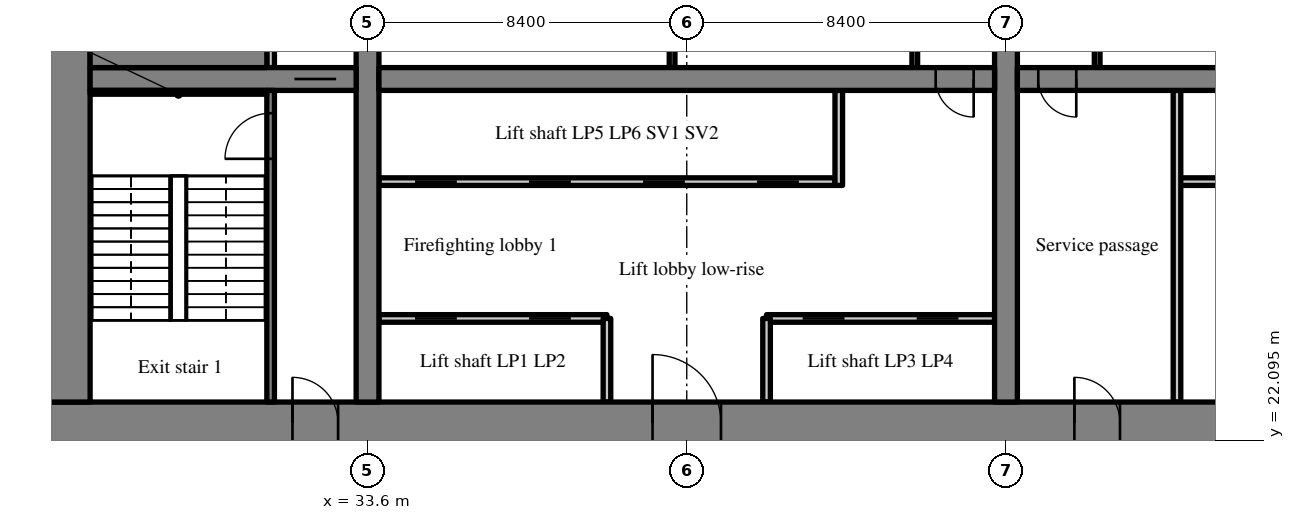
"""IFC4 building model, lengths in metres.
Left out: names, types, materials, properties, quantities, classifications, styles, units other than length and angle.
Written with IfcOpenShell. Run it as: python <this file> out.ifc"""

import sys

from ifc_helpers import new_model, si_unit, direction, frame, frame_2d, origin, place, context, subcontext, project, spatial, rectangle, extrude, source, transform, mapped, element, fill, save


model = new_model("IFC4")
c1 = context("Model", 3, precision=1e-05, world=origin(), true_north=direction((0.0, 1.0)))
c2 = subcontext(c1, "Body", "Model", "MODEL_VIEW")
j1 = project(units=[si_unit("LENGTHUNIT", "METRE"), si_unit("PLANEANGLEUNIT", "RADIAN")], contexts=[c1])
p1 = place(None, origin())
s1 = spatial("IfcSite", under=j1, at=p1, CompositionType="ELEMENT")
p2 = place(p1, origin())
s2 = spatial("IfcBuilding", under=s1, at=p2, CompositionType="ELEMENT")
p3 = place(p2, frame((0.0, 0.0, 23.0)))
s3 = spatial("IfcBuildingStorey", under=s2, at=p3, CompositionType="ELEMENT", Elevation=23.0)
m1 = source(origin(), c2, "Body", "SweptSolid", [
    extrude(rectangle(XDim=50.4, YDim=1.1, at=frame_2d((25.2, 0.0))), origin(), (0.0, 0.0, 1.0), 4.52),
])
p4 = place(p3, frame((25.2, 22.55, 0.0), z_axis=(0.0, 0.0, 1.0), x_axis=(1.0, 0.0, 0.0)))
e1 = element("IfcWall", 1, at=p4, inside=s3, PredefinedType="SHEAR", context=c2, shape_type="MappedRepresentation", body=[
    mapped(m1, transform((0.0, 0.0, 0.0), scale=1.0)),
])
m2 = source(origin(), c2, "Body", "SweptSolid", [
    extrude(rectangle(XDim=1.8, YDim=2.1, at=frame_2d((0.9, 1.05))), frame((0.0, 0.56, 0.0), z_axis=(0.0, -1.0, 0.0), x_axis=(1.0, 0.0, 0.0)), (0.0, 0.0, 1.0), 1.12),
])
p5 = place(p4, frame((15.9, 0.0, 0.0)))
e2 = element("IfcOpeningElement", 2, at=p5, cuts=e1, PredefinedType="OPENING", context=c2, shape_type="MappedRepresentation", body=[
    mapped(m2, transform((0.0, 0.0, 0.0), scale=1.0)),
])
m3 = source(origin(), c2, "Body", "SweptSolid", [
    extrude(rectangle(XDim=1.2, YDim=2.1, at=frame_2d((0.6, 1.05))), frame((0.0, 0.56, 0.0), z_axis=(0.0, -1.0, 0.0), x_axis=(1.0, 0.0, 0.0)), (0.0, 0.0, 1.0), 1.12),
])
p6 = place(p4, frame((27.0, 0.0, 0.0)))
e3 = element("IfcOpeningElement", 3, at=p6, cuts=e1, PredefinedType="OPENING", context=c2, shape_type="MappedRepresentation", body=[
    mapped(m3, transform((0.0, 0.0, 0.0), scale=1.0)),
])
m4 = source(origin(), c2, "Body", "SweptSolid", [
    extrude(rectangle(XDim=0.9, YDim=2.1, at=frame_2d((0.45, 1.05))), frame((0.0, 0.56, 0.0), z_axis=(0.0, -1.0, 0.0), x_axis=(1.0, 0.0, 0.0)), (0.0, 0.0, 1.0), 1.12),
])
p7 = place(p4, frame((32.25, 0.0, 0.0)))
e4 = element("IfcOpeningElement", 4, at=p7, cuts=e1, PredefinedType="OPENING", context=c2, shape_type="MappedRepresentation", body=[
    mapped(m4, transform((0.0, 0.0, 0.0), scale=1.0)),
])
p8 = place(p4, frame((38.25, 0.0, 0.0)))
e5 = element("IfcOpeningElement", 5, at=p8, cuts=e1, PredefinedType="OPENING", context=c2, shape_type="MappedRepresentation", body=[
    mapped(m4, transform((0.0, 0.0, 0.0), scale=1.0)),
])
p9 = place(p4, frame((6.425, 0.0, 0.0)))
e6 = element("IfcOpeningElement", 6, at=p9, cuts=e1, PredefinedType="OPENING", context=c2, shape_type="MappedRepresentation", body=[
    mapped(m3, transform((0.0, 0.0, 0.0), scale=1.0)),
])
p10 = place(p4, frame((47.675, 0.0, 0.0)))
e7 = element("IfcOpeningElement", 7, at=p10, cuts=e1, PredefinedType="OPENING", context=c2, shape_type="MappedRepresentation", body=[
    mapped(m3, transform((0.0, 0.0, 0.0), scale=1.0)),
])
m5 = source(origin(), c2, "Body", "SweptSolid", [
    extrude(rectangle(XDim=17.8, YDim=1.1, at=frame_2d((8.9, 0.0))), origin(), (0.0, 0.0, 1.0), 4.52),
])
p11 = place(p3, frame((25.75, 23.1, 0.0), z_axis=(0.0, 0.0, 1.0), x_axis=(0.0, 1.0, 0.0)))
e8 = element("IfcWall", 8, at=p11, inside=s3, PredefinedType="SHEAR", context=c2, shape_type="MappedRepresentation", body=[
    mapped(m5, transform((0.0, 0.0, 0.0), scale=1.0)),
])
m6 = source(origin(), c2, "Body", "SweptSolid", [
    extrude(rectangle(XDim=17.8, YDim=0.6, at=frame_2d((8.9, 0.0))), origin(), (0.0, 0.0, 1.0), 4.52),
])
p12 = place(p3, frame((33.6, 23.1, 0.0), z_axis=(0.0, 0.0, 1.0), x_axis=(0.0, 1.0, 0.0)))
e9 = element("IfcWall", 9, at=p12, inside=s3, PredefinedType="SHEAR", context=c2, shape_type="MappedRepresentation", body=[
    mapped(m6, transform((0.0, 0.0, 0.0), scale=1.0)),
])
m7 = source(origin(), c2, "Body", "SweptSolid", [
    extrude(rectangle(XDim=1.1, YDim=2.1, at=frame_2d((0.55, 1.05))), frame((0.0, 0.31, 0.0), z_axis=(0.0, -1.0, 0.0), x_axis=(1.0, 0.0, 0.0)), (0.0, 0.0, 1.0), 0.62),
])
p13 = place(p12, frame((12.35, 0.0, 0.0)))
e10 = element("IfcOpeningElement", 10, at=p13, cuts=e9, PredefinedType="OPENING", context=c2, shape_type="MappedRepresentation", body=[
    mapped(m7, transform((0.0, 0.0, 0.0), scale=1.0)),
])
p14 = place(p3, frame((50.4, 23.1, 0.0), z_axis=(0.0, 0.0, 1.0), x_axis=(0.0, 1.0, 0.0)))
e11 = element("IfcWall", 11, at=p14, inside=s3, PredefinedType="SHEAR", context=c2, shape_type="MappedRepresentation", body=[
    mapped(m6, transform((0.0, 0.0, 0.0), scale=1.0)),
])
p15 = place(p14, frame((12.35, 0.0, 0.0)))
e12 = element("IfcOpeningElement", 12, at=p15, cuts=e11, PredefinedType="OPENING", context=c2, shape_type="MappedRepresentation", body=[
    mapped(m7, transform((0.0, 0.0, 0.0), scale=1.0)),
])
m8 = source(origin(), c2, "Body", "SweptSolid", [
    extrude(rectangle(XDim=7.0, YDim=0.6, at=frame_2d((3.5, 0.0))), origin(), (0.0, 0.0, 1.0), 4.52),
])
p16 = place(p3, frame((26.3, 31.6, 0.0), z_axis=(0.0, 0.0, 1.0), x_axis=(1.0, 0.0, 0.0)))
e13 = element("IfcWall", 13, at=p16, inside=s3, PredefinedType="SHEAR", context=c2, shape_type="MappedRepresentation", body=[
    mapped(m8, transform((0.0, 0.0, 0.0), scale=1.0)),
])
p17 = place(p16, frame((5.375, 0.0, 0.0)))
e14 = element("IfcOpeningElement", 14, at=p17, cuts=e13, PredefinedType="OPENING", context=c2, shape_type="MappedRepresentation", body=[
    mapped(m7, transform((0.0, 0.0, 0.0), scale=1.0)),
])
m9 = source(origin(), c2, "Body", "SweptSolid", [
    extrude(rectangle(XDim=16.2, YDim=0.6, at=frame_2d((8.1, 0.0))), origin(), (0.0, 0.0, 1.0), 4.52),
])
p18 = place(p3, frame((33.9, 31.6, 0.0), z_axis=(0.0, 0.0, 1.0), x_axis=(1.0, 0.0, 0.0)))
e15 = element("IfcWall", 15, at=p18, inside=s3, PredefinedType="SHEAR", context=c2, shape_type="MappedRepresentation", body=[
    mapped(m9, transform((0.0, 0.0, 0.0), scale=1.0)),
])
m10 = source(origin(), c2, "Body", "SweptSolid", [
    extrude(rectangle(XDim=1.0, YDim=2.1, at=frame_2d((0.5, 1.05))), frame((0.0, 0.31, 0.0), z_axis=(0.0, -1.0, 0.0), x_axis=(1.0, 0.0, 0.0)), (0.0, 0.0, 1.0), 0.62),
])
p19 = place(p18, frame((14.65, 0.0, 0.0)))
e16 = element("IfcOpeningElement", 16, at=p19, cuts=e15, PredefinedType="OPENING", context=c2, shape_type="MappedRepresentation", body=[
    mapped(m10, transform((0.0, 0.0, 0.0), scale=1.0)),
])
m11 = source(origin(), c2, "Body", "SweptSolid", [
    extrude(rectangle(XDim=16.2, YDim=0.6, at=frame_2d((8.1, 0.0))), origin(), (0.0, 0.0, 1.0), 4.52),
])
p20 = place(p3, frame((50.7, 31.6, 0.0), z_axis=(0.0, 0.0, 1.0), x_axis=(1.0, 0.0, 0.0)))
e17 = element("IfcWall", 17, at=p20, inside=s3, PredefinedType="SHEAR", context=c2, shape_type="MappedRepresentation", body=[
    mapped(m11, transform((0.0, 0.0, 0.0), scale=1.0)),
])
p21 = place(p20, frame((0.55, 0.0, 0.0)))
e18 = element("IfcOpeningElement", 18, at=p21, cuts=e17, PredefinedType="OPENING", context=c2, shape_type="MappedRepresentation", body=[
    mapped(m10, transform((0.0, 0.0, 0.0), scale=1.0)),
])
m12 = source(origin(), c2, "Body", "SweptSolid", [
    extrude(rectangle(XDim=6.0, YDim=0.2, at=frame_2d((3.0, 0.0))), origin(), (0.0, 0.0, 1.0), 4.52),
])
p22 = place(p3, frame((33.9, 25.3, 0.0), z_axis=(0.0, 0.0, 1.0), x_axis=(1.0, 0.0, 0.0)))
e19 = element("IfcWall", 19, at=p22, inside=s3, PredefinedType="SOLIDWALL", context=c2, shape_type="MappedRepresentation", body=[
    mapped(m12, transform((0.0, 0.0, 0.0), scale=1.0)),
])
m13 = source(origin(), c2, "Body", "SweptSolid", [
    extrude(rectangle(XDim=1.1, YDim=2.1, at=frame_2d((0.55, 1.05))), frame((0.0, 0.11, 0.0), z_axis=(0.0, -1.0, 0.0), x_axis=(1.0, 0.0, 0.0)), (0.0, 0.0, 1.0), 0.22),
])
p23 = place(p22, frame((0.95, 0.0, 0.0)))
e20 = element("IfcOpeningElement", 20, at=p23, cuts=e19, PredefinedType="OPENING", context=c2, shape_type="MappedRepresentation", body=[
    mapped(m13, transform((0.0, 0.0, 0.0), scale=1.0)),
])
p24 = place(p22, frame((3.95, 0.0, 0.0)))
e21 = element("IfcOpeningElement", 21, at=p24, cuts=e19, PredefinedType="OPENING", context=c2, shape_type="MappedRepresentation", body=[
    mapped(m13, transform((0.0, 0.0, 0.0), scale=1.0)),
])
p25 = place(p3, frame((44.1, 25.3, 0.0), z_axis=(0.0, 0.0, 1.0), x_axis=(1.0, 0.0, 0.0)))
e22 = element("IfcWall", 22, at=p25, inside=s3, PredefinedType="SOLIDWALL", context=c2, shape_type="MappedRepresentation", body=[
    mapped(m12, transform((0.0, 0.0, 0.0), scale=1.0)),
])
p26 = place(p25, frame((0.95, 0.0, 0.0)))
e23 = element("IfcOpeningElement", 23, at=p26, cuts=e22, PredefinedType="OPENING", context=c2, shape_type="MappedRepresentation", body=[
    mapped(m13, transform((0.0, 0.0, 0.0), scale=1.0)),
])
p27 = place(p25, frame((3.95, 0.0, 0.0)))
e24 = element("IfcOpeningElement", 24, at=p27, cuts=e22, PredefinedType="OPENING", context=c2, shape_type="MappedRepresentation", body=[
    mapped(m13, transform((0.0, 0.0, 0.0), scale=1.0)),
])
m14 = source(origin(), c2, "Body", "SweptSolid", [
    extrude(rectangle(XDim=12.0, YDim=0.2, at=frame_2d((6.0, 0.0))), origin(), (0.0, 0.0, 1.0), 4.52),
])
p28 = place(p3, frame((33.9, 28.9, 0.0), z_axis=(0.0, 0.0, 1.0), x_axis=(1.0, 0.0, 0.0)))
e25 = element("IfcWall", 25, at=p28, inside=s3, PredefinedType="SOLIDWALL", context=c2, shape_type="MappedRepresentation", body=[
    mapped(m14, transform((0.0, 0.0, 0.0), scale=1.0)),
])
p29 = place(p28, frame((0.95, 0.0, 0.0)))
e26 = element("IfcOpeningElement", 26, at=p29, cuts=e25, PredefinedType="OPENING", context=c2, shape_type="MappedRepresentation", body=[
    mapped(m13, transform((0.0, 0.0, 0.0), scale=1.0)),
])
p30 = place(p28, frame((3.95, 0.0, 0.0)))
e27 = element("IfcOpeningElement", 27, at=p30, cuts=e25, PredefinedType="OPENING", context=c2, shape_type="MappedRepresentation", body=[
    mapped(m13, transform((0.0, 0.0, 0.0), scale=1.0)),
])
p31 = place(p28, frame((6.95, 0.0, 0.0)))
e28 = element("IfcOpeningElement", 28, at=p31, cuts=e25, PredefinedType="OPENING", context=c2, shape_type="MappedRepresentation", body=[
    mapped(m13, transform((0.0, 0.0, 0.0), scale=1.0)),
])
p32 = place(p28, frame((9.95, 0.0, 0.0)))
e29 = element("IfcOpeningElement", 29, at=p32, cuts=e25, PredefinedType="OPENING", context=c2, shape_type="MappedRepresentation", body=[
    mapped(m13, transform((0.0, 0.0, 0.0), scale=1.0)),
])
m15 = source(origin(), c2, "Body", "SweptSolid", [
    extrude(rectangle(XDim=2.2, YDim=0.2, at=frame_2d((1.1, 0.0))), origin(), (0.0, 0.0, 1.0), 4.52),
])
for number, where, z_axis, x_axis in (
    (30, (39.9, 23.1, 0.0), (0.0, 0.0, 1.0), (0.0, 1.0, 0.0)),
    (31, (44.1, 23.1, 0.0), (0.0, 0.0, 1.0), (0.0, 1.0, 0.0)),
):
    element("IfcWall", number, at=place(p3, frame(where, z_axis=z_axis, x_axis=x_axis)), inside=s3, PredefinedType="SOLIDWALL", context=c2, shape_type="MappedRepresentation", body=[
        mapped(m15, transform((0.0, 0.0, 0.0), scale=1.0)),
    ])
m16 = source(origin(), c2, "Body", "SweptSolid", [
    extrude(rectangle(XDim=2.5, YDim=0.2, at=frame_2d((1.25, 0.0))), origin(), (0.0, 0.0, 1.0), 4.52),
])
p33 = place(p3, frame((46.0, 28.8, 0.0), z_axis=(0.0, 0.0, 1.0), x_axis=(0.0, 1.0, 0.0)))
e32 = element("IfcWall", 32, at=p33, inside=s3, PredefinedType="SOLIDWALL", context=c2, shape_type="MappedRepresentation", body=[
    mapped(m16, transform((0.0, 0.0, 0.0), scale=1.0)),
])
m17 = source(origin(), c2, "Body", "SweptSolid", [
    extrude(rectangle(XDim=3.1, YDim=0.15, at=frame_2d((1.55, 0.0))), origin(), (0.0, 0.0, 1.0), 4.52),
])
for number, where, z_axis, x_axis in (
    (33, (48.0, 31.9, 0.0), (0.0, 0.0, 1.0), (0.0, 1.0, 0.0)),
    (34, (41.614, 31.9, 0.0), (0.0, 0.0, 1.0), (0.0, 1.0, 0.0)),
):
    element("IfcWall", number, at=place(p3, frame(where, z_axis=z_axis, x_axis=x_axis)), inside=s3, PredefinedType="PARTITIONING", context=c2, shape_type="MappedRepresentation", body=[
        mapped(m17, transform((0.0, 0.0, 0.0), scale=1.0)),
    ])
p34 = place(p3, frame((60.9, 28.9, 0.0), z_axis=(0.0, 0.0, 1.0), x_axis=(-1.0, 0.0, 0.0)))
e35 = element("IfcWall", 35, at=p34, inside=s3, PredefinedType="SOLIDWALL", context=c2, shape_type="MappedRepresentation", body=[
    mapped(m12, transform((0.0, 0.0, 0.0), scale=1.0)),
])
m18 = source(origin(), c2, "Body", "SweptSolid", [
    extrude(rectangle(XDim=8.2, YDim=0.2, at=frame_2d((4.1, 0.0))), origin(), (0.0, 0.0, 1.0), 4.52),
])
p35 = place(p3, frame((54.9, 23.1, 0.0), z_axis=(0.0, 0.0, 1.0), x_axis=(0.0, 1.0, 0.0)))
e36 = element("IfcWall", 36, at=p35, inside=s3, PredefinedType="PARTITIONING", context=c2, shape_type="MappedRepresentation", body=[
    mapped(m18, transform((0.0, 0.0, 0.0), scale=1.0)),
])
p36 = place(p3, frame((52.8, 31.9, 0.0), z_axis=(0.0, 0.0, 1.0), x_axis=(0.0, 1.0, 0.0)))
e37 = element("IfcWall", 37, at=p36, inside=s3, PredefinedType="PARTITIONING", context=c2, shape_type="MappedRepresentation", body=[
    mapped(m17, transform((0.0, 0.0, 0.0), scale=1.0)),
])
m19 = source(origin(), c2, "Body", "SweptSolid", [
    extrude(rectangle(XDim=8.2, YDim=0.2, at=frame_2d((4.1, 0.0))), origin(), (0.0, 0.0, 1.0), 4.52),
])
p37 = place(p3, frame((31.05, 23.1, 0.0), z_axis=(0.0, 0.0, 1.0), x_axis=(0.0, 1.0, 0.0)))
e38 = element("IfcWall", 38, at=p37, inside=s3, PredefinedType="SOLIDWALL", context=c2, shape_type="MappedRepresentation", body=[
    mapped(m19, transform((0.0, 0.0, 0.0), scale=1.0)),
])
m20 = source(origin(), c2, "Body", "SweptSolid", [
    extrude(rectangle(XDim=1.2, YDim=2.1, at=frame_2d((0.6, 1.05))), frame((0.0, 0.11, 0.0), z_axis=(0.0, -1.0, 0.0), x_axis=(1.0, 0.0, 0.0)), (0.0, 0.0, 1.0), 0.22),
])
p38 = place(p37, frame((6.4, 0.0, 0.0)))
e39 = element("IfcOpeningElement", 39, at=p38, cuts=e38, PredefinedType="OPENING", context=c2, shape_type="MappedRepresentation", body=[
    mapped(m20, transform((0.0, 0.0, 0.0), scale=1.0)),
])
m21 = source(origin(), c2, "Body", "SweptSolid", [
    extrude(rectangle(XDim=1.7, YDim=0.2, at=frame_2d((0.85, 0.0))), origin(), (0.0, 0.0, 1.0), 4.52),
])
p39 = place(p3, frame((31.05, 31.9, 0.0), z_axis=(0.0, 0.0, 1.0), x_axis=(0.0, 1.0, 0.0)))
e40 = element("IfcWall", 40, at=p39, inside=s3, PredefinedType="SOLIDWALL", context=c2, shape_type="MappedRepresentation", body=[
    mapped(m21, transform((0.0, 0.0, 0.0), scale=1.0)),
])
m22 = source(origin(), c2, "Body", "SweptSolid", [
    extrude(rectangle(XDim=4.65, YDim=0.1, at=frame_2d((2.325, 0.0))), origin(), (0.0, 0.0, 1.0), 4.52),
])
p40 = place(p3, frame((26.3, 31.25, 0.0), z_axis=(0.0, 0.0, 1.0), x_axis=(1.0, 0.0, 0.0)))
e41 = element("IfcWall", 41, at=p40, inside=s3, PredefinedType="SOLIDWALL", context=c2, shape_type="MappedRepresentation", body=[
    mapped(m22, transform((0.0, 0.0, 0.0), scale=1.0)),
])
m23 = source(origin(), c2, "Body", "SweptSolid", [
    extrude(rectangle(XDim=4.65, YDim=0.9, at=frame_2d((2.325, 0.0))), origin(), (0.0, 0.0, 1.0), 4.52),
])
p41 = place(p3, frame((26.3, 32.35, 0.0), z_axis=(0.0, 0.0, 1.0), x_axis=(1.0, 0.0, 0.0)))
e42 = element("IfcWall", 42, at=p41, inside=s3, PredefinedType="SOLIDWALL", context=c2, shape_type="MappedRepresentation", body=[
    mapped(m23, transform((0.0, 0.0, 0.0), scale=1.0)),
])
m24 = source(origin(), c2, "Body", "SweptSolid", [
    extrude(rectangle(XDim=1.8, YDim=2.1, at=frame_2d((0.9, 1.05))), frame((0.0, 0.325, 0.0), z_axis=(0.0, -1.0, 0.0), x_axis=(1.0, 0.0, 0.0)), (0.0, 0.0, 1.0), 0.05),
])
p42 = place(p5, origin())
e43 = element("IfcDoor", 43, at=p42, inside=s3, OperationType="DOUBLE_DOOR_SINGLE_SWING", PredefinedType="DOOR", context=c2, shape_type="MappedRepresentation", body=[
    mapped(m24, transform((0.0, 0.0, 0.0), scale=1.0)),
])
fill(e2, e43)
m25 = source(origin(), c2, "Body", "SweptSolid", [
    extrude(rectangle(XDim=1.0, YDim=2.1, at=frame_2d((0.5, 1.05))), frame((0.0, 0.025, 0.0), z_axis=(0.0, -1.0, 0.0), x_axis=(1.0, 0.0, 0.0)), (0.0, 0.0, 1.0), 0.05),
])
p43 = place(p19, origin())
e44 = element("IfcDoor", 44, at=p43, inside=s3, OperationType="SINGLE_SWING_RIGHT", PredefinedType="DOOR", context=c2, shape_type="MappedRepresentation", body=[
    mapped(m25, transform((0.0, 0.0, 0.0), scale=1.0)),
])
fill(e16, e44)
m26 = source(origin(), c2, "Body", "SweptSolid", [
    extrude(rectangle(XDim=1.1, YDim=2.1, at=frame_2d((0.55, 1.05))), frame((0.0, 0.025, 0.0), z_axis=(0.0, -1.0, 0.0), x_axis=(1.0, 0.0, 0.0)), (0.0, 0.0, 1.0), 0.05),
])
p44 = place(p23, origin())
e45 = element("IfcDoor", 45, at=p44, inside=s3, OperationType="SLIDING_TO_LEFT", PredefinedType="DOOR", context=c2, shape_type="MappedRepresentation", body=[
    mapped(m26, transform((0.0, 0.0, 0.0), scale=1.0)),
])
fill(e20, e45)
p45 = place(p24, origin())
e46 = element("IfcDoor", 46, at=p45, inside=s3, OperationType="SLIDING_TO_RIGHT", PredefinedType="DOOR", context=c2, shape_type="MappedRepresentation", body=[
    mapped(m26, transform((0.0, 0.0, 0.0), scale=1.0)),
])
fill(e21, e46)
p46 = place(p26, origin())
e47 = element("IfcDoor", 47, at=p46, inside=s3, OperationType="SLIDING_TO_LEFT", PredefinedType="DOOR", context=c2, shape_type="MappedRepresentation", body=[
    mapped(m26, transform((0.0, 0.0, 0.0), scale=1.0)),
])
fill(e23, e47)
p47 = place(p27, origin())
e48 = element("IfcDoor", 48, at=p47, inside=s3, OperationType="SLIDING_TO_RIGHT", PredefinedType="DOOR", context=c2, shape_type="MappedRepresentation", body=[
    mapped(m26, transform((0.0, 0.0, 0.0), scale=1.0)),
])
fill(e24, e48)
p48 = place(p29, origin())
e49 = element("IfcDoor", 49, at=p48, inside=s3, OperationType="SLIDING_TO_LEFT", PredefinedType="DOOR", context=c2, shape_type="MappedRepresentation", body=[
    mapped(m26, transform((0.0, 0.0, 0.0), scale=1.0)),
])
fill(e26, e49)
p49 = place(p30, origin())
e50 = element("IfcDoor", 50, at=p49, inside=s3, OperationType="SLIDING_TO_RIGHT", PredefinedType="DOOR", context=c2, shape_type="MappedRepresentation", body=[
    mapped(m26, transform((0.0, 0.0, 0.0), scale=1.0)),
])
fill(e27, e50)
p50 = place(p31, origin())
e51 = element("IfcDoor", 51, at=p50, inside=s3, OperationType="SLIDING_TO_LEFT", PredefinedType="DOOR", context=c2, shape_type="MappedRepresentation", body=[
    mapped(m26, transform((0.0, 0.0, 0.0), scale=1.0)),
])
fill(e28, e51)
p51 = place(p32, origin())
e52 = element("IfcDoor", 52, at=p51, inside=s3, OperationType="SLIDING_TO_RIGHT", PredefinedType="DOOR", context=c2, shape_type="MappedRepresentation", body=[
    mapped(m26, transform((0.0, 0.0, 0.0), scale=1.0)),
])
fill(e29, e52)
m27 = source(origin(), c2, "Body", "SweptSolid", [
    extrude(rectangle(XDim=1.2, YDim=2.1, at=frame_2d((0.6, 1.05))), frame((0.0, 0.325, 0.0), z_axis=(0.0, -1.0, 0.0), x_axis=(1.0, 0.0, 0.0)), (0.0, 0.0, 1.0), 0.05),
])
p52 = place(p6, origin())
e53 = element("IfcDoor", 53, at=p52, inside=s3, OperationType="SINGLE_SWING_LEFT", PredefinedType="DOOR", context=c2, shape_type="MappedRepresentation", body=[
    mapped(m27, transform((0.0, 0.0, 0.0), scale=1.0)),
])
fill(e3, e53)
p53 = place(p21, origin())
e54 = element("IfcDoor", 54, at=p53, inside=s3, OperationType="SINGLE_SWING_RIGHT", PredefinedType="DOOR", context=c2, shape_type="MappedRepresentation", body=[
    mapped(m25, transform((0.0, 0.0, 0.0), scale=1.0)),
])
fill(e18, e54)
m28 = source(origin(), c2, "Body", "SweptSolid", [
    extrude(rectangle(XDim=1.2, YDim=2.1, at=frame_2d((0.6, 1.05))), frame((0.0, 0.025, 0.0), z_axis=(0.0, -1.0, 0.0), x_axis=(1.0, 0.0, 0.0)), (0.0, 0.0, 1.0), 0.05),
])
p54 = place(p38, origin())
e55 = element("IfcDoor", 55, at=p54, inside=s3, OperationType="SINGLE_SWING_LEFT", PredefinedType="DOOR", context=c2, shape_type="MappedRepresentation", body=[
    mapped(m28, transform((0.0, 0.0, 0.0), scale=1.0)),
])
fill(e39, e55)
p55 = place(p9, origin())
e56 = element("IfcDoor", 56, at=p55, inside=s3, OperationType="SINGLE_SWING_LEFT", PredefinedType="DOOR", context=c2, shape_type="MappedRepresentation", body=[
    mapped(m27, transform((0.0, 0.0, 0.0), scale=1.0)),
])
fill(e6, e56)
p56 = place(p17, origin())
e57 = element("IfcDoor", 57, at=p56, inside=s3, OperationType="SLIDING_TO_RIGHT", PredefinedType="DOOR", context=c2, shape_type="MappedRepresentation", body=[
    mapped(m26, transform((0.0, 0.0, 0.0), scale=1.0)),
])
fill(e14, e57)
save(model, sys.argv[1])
